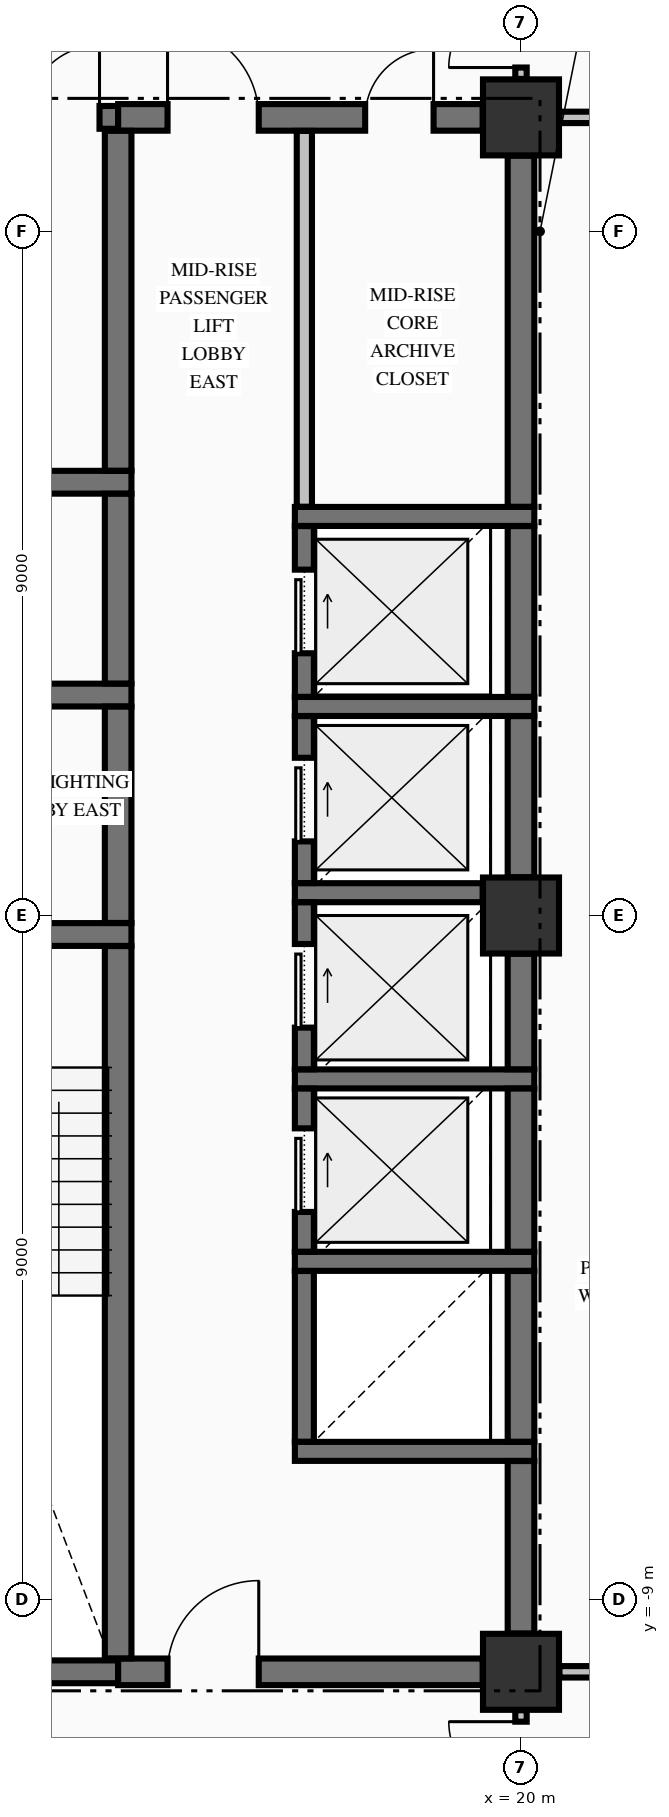
"""IFC4 building model, lengths in metres.
Left out: names, types, materials, properties, quantities, classifications, styles, units other than length and angle.
Written with IfcOpenShell. Run it as: python <this file> out.ifc"""

import sys

from ifc_helpers import new_model, si_unit, direction, frame, frame_2d, origin, origin_2d, place, context, subcontext, project, spatial, rectangle, extrude, element, fill, save


model = new_model("IFC4")
c1 = context("Model", 3, precision=1e-05, world=origin(), true_north=direction((0.0, 1.0)))
c2 = subcontext(c1, "Body", "Model", "MODEL_VIEW")
j1 = project(units=[si_unit("LENGTHUNIT", "METRE"), si_unit("PLANEANGLEUNIT", "RADIAN")], contexts=[c1])
p1 = place(None, origin())
s1 = spatial("IfcSite", under=j1, at=p1, CompositionType="ELEMENT")
p2 = place(p1, origin())
s2 = spatial("IfcBuilding", under=s1, at=p2, CompositionType="ELEMENT")
p3 = place(p2, frame((0.0, 0.0, 142.77)))
s3 = spatial("IfcBuildingStorey", under=s2, at=p3, CompositionType="ELEMENT", Elevation=142.77)
for number, where, z_axis, x_axis in (
    (1, (20.0, -9.95, -0.325), (0.0, 0.0, 1.0), (1.0, 0.0, 0.0)),
    (2, (20.0, 10.5, -0.325), (0.0, 0.0, 1.0), (1.0, 0.0, 0.0)),
    (3, (20.0, 0.0, -0.325), (0.0, 0.0, 1.0), (1.0, 0.0, 0.0)),
):
    element("IfcColumn", number, at=place(p3, frame(where, z_axis=z_axis, x_axis=x_axis)), inside=s3, PredefinedType="COLUMN", context=c2, shape_type="SweptSolid", body=[
        extrude(rectangle(XDim=1.0, YDim=1.0, at=origin_2d()), origin(), (0.0, 0.0, 1.0), 3.645),
    ])
p4 = place(p3, frame((11.504, -9.95, 0.0), z_axis=(0.0, 0.0, 1.0), x_axis=(1.0, 0.0, 0.0)))
e4 = element("IfcWall", 4, at=p4, inside=s3, PredefinedType="SHEAR", context=c2, shape_type="SweptSolid", body=[
    extrude(rectangle(XDim=3.196, YDim=0.3, at=frame_2d((1.598, 0.0))), origin(), (0.0, 0.0, 1.0), 3.32),
])
p5 = place(p3, frame((14.7, -9.95, 0.0), z_axis=(0.0, 0.0, 1.0), x_axis=(1.0, 0.0, 0.0)))
e5 = element("IfcWall", 5, at=p5, inside=s3, PredefinedType="SHEAR", context=c2, shape_type="SweptSolid", body=[
    extrude(rectangle(XDim=4.796, YDim=0.35, at=frame_2d((2.398, 0.0))), origin(), (0.0, 0.0, 1.0), 3.32),
])
p6 = place(p5, frame((0.65, 0.0, 0.0)))
e6 = element("IfcOpeningElement", 6, at=p6, cuts=e5, PredefinedType="OPENING", context=c2, shape_type="SweptSolid", body=[
    extrude(rectangle(XDim=1.2, YDim=2.15, at=frame_2d((0.6, 1.075))), frame((0.0, 0.185, 0.0), z_axis=(0.0, -1.0, 0.0), x_axis=(1.0, 0.0, 0.0)), (0.0, 0.0, 1.0), 0.37),
])
for number, where, z_axis, x_axis in (
    (7, (17.025, -7.05, 0.0), (0.0, 0.0, 1.0), (1.0, 0.0, 0.0)),
    (8, (17.025, -4.55, 0.0), (0.0, 0.0, 1.0), (1.0, 0.0, 0.0)),
    (9, (17.025, -2.15, 0.0), (0.0, 0.0, 1.0), (1.0, 0.0, 0.0)),
):
    element("IfcWall", number, at=place(p3, frame(where, z_axis=z_axis, x_axis=x_axis)), inside=s3, PredefinedType="SOLIDWALL", context=c2, shape_type="SweptSolid", body=[
        extrude(rectangle(XDim=3.15, YDim=0.25, at=frame_2d((1.575, 0.0))), origin(), (0.0, 0.0, 1.0), 3.32),
    ])
p7 = place(p3, frame((11.504, -0.25, 0.0), z_axis=(0.0, 0.0, 1.0), x_axis=(1.0, 0.0, 0.0)))
e10 = element("IfcWall", 10, at=p7, inside=s3, PredefinedType="SHEAR", context=c2, shape_type="SweptSolid", body=[
    extrude(rectangle(XDim=3.371, YDim=0.3, at=frame_2d((1.686, 0.0))), origin(), (0.0, 0.0, 1.0), 3.32),
])
p8 = place(p7, frame((1.096, 0.0, 0.0)))
e11 = element("IfcOpeningElement", 11, at=p8, cuts=e10, PredefinedType="OPENING", context=c2, shape_type="SweptSolid", body=[
    extrude(rectangle(XDim=1.1, YDim=2.15, at=frame_2d((0.55, 1.075))), frame((0.0, 0.16, 0.0), z_axis=(0.0, -1.0, 0.0), x_axis=(1.0, 0.0, 0.0)), (0.0, 0.0, 1.0), 0.32),
])
p9 = place(p3, frame((17.025, 0.3, 0.0), z_axis=(0.0, 0.0, 1.0), x_axis=(1.0, 0.0, 0.0)))
e12 = element("IfcWall", 12, at=p9, inside=s3, PredefinedType="SOLIDWALL", context=c2, shape_type="SweptSolid", body=[
    extrude(rectangle(XDim=2.471, YDim=0.25, at=frame_2d((1.236, 0.0))), origin(), (0.0, 0.0, 1.0), 3.32),
])
p10 = place(p3, frame((17.025, 2.75, 0.0), z_axis=(0.0, 0.0, 1.0), x_axis=(1.0, 0.0, 0.0)))
e13 = element("IfcWall", 13, at=p10, inside=s3, PredefinedType="SOLIDWALL", context=c2, shape_type="SweptSolid", body=[
    extrude(rectangle(XDim=3.15, YDim=0.25, at=frame_2d((1.575, 0.0))), origin(), (0.0, 0.0, 1.0), 3.32),
])
p11 = place(p3, frame((10.85, 2.9, 0.0), z_axis=(0.0, 0.0, 1.0), x_axis=(1.0, 0.0, 0.0)))
e14 = element("IfcWall", 14, at=p11, inside=s3, PredefinedType="SHEAR", context=c2, shape_type="SweptSolid", body=[
    extrude(rectangle(XDim=4.025, YDim=0.3, at=frame_2d((2.012, 0.0))), origin(), (0.0, 0.0, 1.0), 3.32),
])
p12 = place(p11, frame((0.85, 0.0, 0.0)))
e15 = element("IfcOpeningElement", 15, at=p12, cuts=e14, PredefinedType="OPENING", context=c2, shape_type="SweptSolid", body=[
    extrude(rectangle(XDim=1.1, YDim=2.2, at=frame_2d((0.55, 1.1))), frame((0.0, 0.16, 0.0), z_axis=(0.0, -1.0, 0.0), x_axis=(1.0, 0.0, 0.0)), (0.0, 0.0, 1.0), 0.32),
])
p13 = place(p3, frame((17.025, 5.25, 0.0), z_axis=(0.0, 0.0, 1.0), x_axis=(1.0, 0.0, 0.0)))
e16 = element("IfcWall", 16, at=p13, inside=s3, PredefinedType="SOLIDWALL", context=c2, shape_type="SweptSolid", body=[
    extrude(rectangle(XDim=3.15, YDim=0.25, at=frame_2d((1.575, 0.0))), origin(), (0.0, 0.0, 1.0), 3.32),
])
p14 = place(p3, frame((10.85, 5.7, 0.0), z_axis=(0.0, 0.0, 1.0), x_axis=(1.0, 0.0, 0.0)))
e17 = element("IfcWall", 17, at=p14, inside=s3, PredefinedType="SHEAR", context=c2, shape_type="SweptSolid", body=[
    extrude(rectangle(XDim=4.025, YDim=0.3, at=frame_2d((2.012, 0.0))), origin(), (0.0, 0.0, 1.0), 3.32),
])
p15 = place(p3, frame((11.504, 10.5, 0.0), z_axis=(0.0, 0.0, 1.0), x_axis=(1.0, 0.0, 0.0)))
e18 = element("IfcWall", 18, at=p15, inside=s3, PredefinedType="SHEAR", context=c2, shape_type="SweptSolid", body=[
    extrude(rectangle(XDim=3.196, YDim=0.3, at=frame_2d((1.598, 0.0))), origin(), (0.0, 0.0, 1.0), 3.32),
])
p16 = place(p15, frame((2.001, 0.0, 0.0)))
e19 = element("IfcOpeningElement", 19, at=p16, cuts=e18, PredefinedType="OPENING", context=c2, shape_type="SweptSolid", body=[
    extrude(rectangle(XDim=0.95, YDim=2.15, at=frame_2d((0.475, 1.075))), frame((0.0, 0.16, 0.0), z_axis=(0.0, -1.0, 0.0), x_axis=(1.0, 0.0, 0.0)), (0.0, 0.0, 1.0), 0.32),
])
p17 = place(p3, frame((14.7, 10.5, 0.0), z_axis=(0.0, 0.0, 1.0), x_axis=(1.0, 0.0, 0.0)))
e20 = element("IfcWall", 20, at=p17, inside=s3, PredefinedType="SHEAR", context=c2, shape_type="SweptSolid", body=[
    extrude(rectangle(XDim=4.796, YDim=0.35, at=frame_2d((2.398, 0.0))), origin(), (0.0, 0.0, 1.0), 3.32),
])
p18 = place(p17, frame((0.65, 0.0, 0.0)))
e21 = element("IfcOpeningElement", 21, at=p18, cuts=e20, PredefinedType="OPENING", context=c2, shape_type="SweptSolid", body=[
    extrude(rectangle(XDim=1.2, YDim=2.15, at=frame_2d((0.6, 1.075))), frame((0.0, 0.185, 0.0), z_axis=(0.0, -1.0, 0.0), x_axis=(1.0, 0.0, 0.0)), (0.0, 0.0, 1.0), 0.37),
])
p19 = place(p17, frame((3.25, 0.0, 0.0)))
e22 = element("IfcOpeningElement", 22, at=p19, cuts=e20, PredefinedType="OPENING", context=c2, shape_type="SweptSolid", body=[
    extrude(rectangle(XDim=0.9, YDim=2.15, at=frame_2d((0.45, 1.075))), frame((0.0, 0.185, 0.0), z_axis=(0.0, -1.0, 0.0), x_axis=(1.0, 0.0, 0.0)), (0.0, 0.0, 1.0), 0.37),
])
p20 = place(p3, frame((20.506, -9.95, 0.0), z_axis=(0.0, 0.0, 1.0), x_axis=(1.0, 0.0, 0.0)))
e23 = element("IfcWall", 23, at=p20, inside=s3, PredefinedType="PARTITIONING", context=c2, shape_type="SweptSolid", body=[
    extrude(rectangle(XDim=2.329, YDim=0.15, at=frame_2d((1.165, 0.0))), origin(), (0.0, 0.0, 1.0), 3.32),
])
p21 = place(p20, frame((0.494, 0.0, 0.0)))
e24 = element("IfcOpeningElement", 24, at=p21, cuts=e23, PredefinedType="OPENING", context=c2, shape_type="SweptSolid", body=[
    extrude(rectangle(XDim=1.0, YDim=2.15, at=frame_2d((0.5, 1.075))), frame((0.0, 0.085, 0.0), z_axis=(0.0, -1.0, 0.0), x_axis=(1.0, 0.0, 0.0)), (0.0, 0.0, 1.0), 0.17),
])
p22 = place(p3, frame((20.506, 10.5, 0.0), z_axis=(0.0, 0.0, 1.0), x_axis=(1.0, 0.0, 0.0)))
e25 = element("IfcWall", 25, at=p22, inside=s3, PredefinedType="PARTITIONING", context=c2, shape_type="SweptSolid", body=[
    extrude(rectangle(XDim=2.329, YDim=0.15, at=frame_2d((1.165, 0.0))), origin(), (0.0, 0.0, 1.0), 3.32),
])
p23 = place(p22, frame((0.494, 0.0, 0.0)))
e26 = element("IfcOpeningElement", 26, at=p23, cuts=e25, PredefinedType="OPENING", context=c2, shape_type="SweptSolid", body=[
    extrude(rectangle(XDim=1.0, YDim=2.15, at=frame_2d((0.5, 1.075))), frame((0.0, 0.085, 0.0), z_axis=(0.0, -1.0, 0.0), x_axis=(1.0, 0.0, 0.0)), (0.0, 0.0, 1.0), 0.17),
])
p24 = place(p3, frame((14.7, -9.773, 0.0), z_axis=(0.0, 0.0, 1.0), x_axis=(0.0, 1.0, 0.0)))
e27 = element("IfcWall", 27, at=p24, inside=s3, PredefinedType="SHEAR", context=c2, shape_type="SweptSolid", body=[
    extrude(rectangle(XDim=9.371, YDim=0.35, at=frame_2d((4.686, 0.0))), origin(), (0.0, 0.0, 1.0), 3.32),
])
p25 = place(p3, frame((14.7, -0.098, 0.0), z_axis=(0.0, 0.0, 1.0), x_axis=(0.0, 1.0, 0.0)))
e28 = element("IfcWall", 28, at=p25, inside=s3, PredefinedType="SHEAR", context=c2, shape_type="SweptSolid", body=[
    extrude(rectangle(XDim=2.846, YDim=0.35, at=frame_2d((1.423, 0.0))), origin(), (0.0, 0.0, 1.0), 3.32),
])
p26 = place(p3, frame((14.7, 3.052, 0.0), z_axis=(0.0, 0.0, 1.0), x_axis=(0.0, 1.0, 0.0)))
e29 = element("IfcWall", 29, at=p26, inside=s3, PredefinedType="SHEAR", context=c2, shape_type="SweptSolid", body=[
    extrude(rectangle(XDim=2.496, YDim=0.35, at=frame_2d((1.248, 0.0))), origin(), (0.0, 0.0, 1.0), 3.32),
])
p27 = place(p3, frame((14.7, 5.852, 0.0), z_axis=(0.0, 0.0, 1.0), x_axis=(0.0, 1.0, 0.0)))
e30 = element("IfcWall", 30, at=p27, inside=s3, PredefinedType="SHEAR", context=c2, shape_type="SweptSolid", body=[
    extrude(rectangle(XDim=4.471, YDim=0.35, at=frame_2d((2.235, 0.0))), origin(), (0.0, 0.0, 1.0), 3.32),
])
p28 = place(p3, frame((17.15, -6.923, 0.0), z_axis=(0.0, 0.0, 1.0), x_axis=(0.0, 1.0, 0.0)))
e31 = element("IfcWall", 31, at=p28, inside=s3, PredefinedType="SOLIDWALL", context=c2, shape_type="SweptSolid", body=[
    extrude(rectangle(XDim=2.246, YDim=0.25, at=frame_2d((1.123, 0.0))), origin(), (0.0, 0.0, 1.0), 3.32),
])
p29 = place(p3, frame((17.15, -4.423, 0.0), z_axis=(0.0, 0.0, 1.0), x_axis=(0.0, 1.0, 0.0)))
e32 = element("IfcWall", 32, at=p29, inside=s3, PredefinedType="SOLIDWALL", context=c2, shape_type="SweptSolid", body=[
    extrude(rectangle(XDim=2.146, YDim=0.25, at=frame_2d((1.073, 0.0))), origin(), (0.0, 0.0, 1.0), 3.32),
])
p30 = place(p29, frame((0.523, 0.0, 0.0)))
e33 = element("IfcOpeningElement", 33, at=p30, cuts=e32, PredefinedType="OPENING", context=c2, shape_type="SweptSolid", body=[
    extrude(rectangle(XDim=1.1, YDim=2.2, at=frame_2d((0.55, 1.1))), frame((0.0, 0.135, 0.0), z_axis=(0.0, -1.0, 0.0), x_axis=(1.0, 0.0, 0.0)), (0.0, 0.0, 1.0), 0.27),
])
p31 = place(p3, frame((17.15, -2.023, 0.0), z_axis=(0.0, 0.0, 1.0), x_axis=(0.0, 1.0, 0.0)))
e34 = element("IfcWall", 34, at=p31, inside=s3, PredefinedType="SOLIDWALL", context=c2, shape_type="SweptSolid", body=[
    extrude(rectangle(XDim=2.196, YDim=0.25, at=frame_2d((1.098, 0.0))), origin(), (0.0, 0.0, 1.0), 3.32),
])
p32 = place(p31, frame((0.548, 0.0, 0.0)))
e35 = element("IfcOpeningElement", 35, at=p32, cuts=e34, PredefinedType="OPENING", context=c2, shape_type="SweptSolid", body=[
    extrude(rectangle(XDim=1.1, YDim=2.2, at=frame_2d((0.55, 1.1))), frame((0.0, 0.135, 0.0), z_axis=(0.0, -1.0, 0.0), x_axis=(1.0, 0.0, 0.0)), (0.0, 0.0, 1.0), 0.27),
])
p33 = place(p3, frame((17.15, 0.427, 0.0), z_axis=(0.0, 0.0, 1.0), x_axis=(0.0, 1.0, 0.0)))
e36 = element("IfcWall", 36, at=p33, inside=s3, PredefinedType="SOLIDWALL", context=c2, shape_type="SweptSolid", body=[
    extrude(rectangle(XDim=2.196, YDim=0.25, at=frame_2d((1.098, 0.0))), origin(), (0.0, 0.0, 1.0), 3.32),
])
p34 = place(p33, frame((0.548, 0.0, 0.0)))
e37 = element("IfcOpeningElement", 37, at=p34, cuts=e36, PredefinedType="OPENING", context=c2, shape_type="SweptSolid", body=[
    extrude(rectangle(XDim=1.1, YDim=2.2, at=frame_2d((0.55, 1.1))), frame((0.0, 0.135, 0.0), z_axis=(0.0, -1.0, 0.0), x_axis=(1.0, 0.0, 0.0)), (0.0, 0.0, 1.0), 0.27),
])
p35 = place(p3, frame((17.15, 2.877, 0.0), z_axis=(0.0, 0.0, 1.0), x_axis=(0.0, 1.0, 0.0)))
e38 = element("IfcWall", 38, at=p35, inside=s3, PredefinedType="SOLIDWALL", context=c2, shape_type="SweptSolid", body=[
    extrude(rectangle(XDim=2.246, YDim=0.25, at=frame_2d((1.123, 0.0))), origin(), (0.0, 0.0, 1.0), 3.32),
])
p36 = place(p35, frame((0.573, 0.0, 0.0)))
e39 = element("IfcOpeningElement", 39, at=p36, cuts=e38, PredefinedType="OPENING", context=c2, shape_type="SweptSolid", body=[
    extrude(rectangle(XDim=1.1, YDim=2.2, at=frame_2d((0.55, 1.1))), frame((0.0, 0.135, 0.0), z_axis=(0.0, -1.0, 0.0), x_axis=(1.0, 0.0, 0.0)), (0.0, 0.0, 1.0), 0.27),
])
p37 = place(p3, frame((20.0, -9.446, 0.0), z_axis=(0.0, 0.0, 1.0), x_axis=(0.0, 1.0, 0.0)))
e40 = element("IfcWall", 40, at=p37, inside=s3, PredefinedType="SHEAR", context=c2, shape_type="SweptSolid", body=[
    extrude(rectangle(XDim=2.269, YDim=0.35, at=frame_2d((1.135, 0.0))), origin(), (0.0, 0.0, 1.0), 3.32),
])
p38 = place(p3, frame((20.0, -6.923, 0.0), z_axis=(0.0, 0.0, 1.0), x_axis=(0.0, 1.0, 0.0)))
e41 = element("IfcWall", 41, at=p38, inside=s3, PredefinedType="SHEAR", context=c2, shape_type="SweptSolid", body=[
    extrude(rectangle(XDim=2.246, YDim=0.35, at=frame_2d((1.123, 0.0))), origin(), (0.0, 0.0, 1.0), 3.32),
])
p39 = place(p3, frame((20.0, -4.423, 0.0), z_axis=(0.0, 0.0, 1.0), x_axis=(0.0, 1.0, 0.0)))
e42 = element("IfcWall", 42, at=p39, inside=s3, PredefinedType="SHEAR", context=c2, shape_type="SweptSolid", body=[
    extrude(rectangle(XDim=2.146, YDim=0.35, at=frame_2d((1.073, 0.0))), origin(), (0.0, 0.0, 1.0), 3.32),
])
p40 = place(p3, frame((20.0, -2.023, 0.0), z_axis=(0.0, 0.0, 1.0), x_axis=(0.0, 1.0, 0.0)))
e43 = element("IfcWall", 43, at=p40, inside=s3, PredefinedType="SHEAR", context=c2, shape_type="SweptSolid", body=[
    extrude(rectangle(XDim=1.519, YDim=0.35, at=frame_2d((0.76, 0.0))), origin(), (0.0, 0.0, 1.0), 3.32),
])
p41 = place(p3, frame((20.0, 0.504, 0.0), z_axis=(0.0, 0.0, 1.0), x_axis=(0.0, 1.0, 0.0)))
e44 = element("IfcWall", 44, at=p41, inside=s3, PredefinedType="SHEAR", context=c2, shape_type="SweptSolid", body=[
    extrude(rectangle(XDim=2.119, YDim=0.35, at=frame_2d((1.06, 0.0))), origin(), (0.0, 0.0, 1.0), 3.32),
])
p42 = place(p3, frame((20.0, 2.877, 0.0), z_axis=(0.0, 0.0, 1.0), x_axis=(0.0, 1.0, 0.0)))
e45 = element("IfcWall", 45, at=p42, inside=s3, PredefinedType="SHEAR", context=c2, shape_type="SweptSolid", body=[
    extrude(rectangle(XDim=2.246, YDim=0.35, at=frame_2d((1.123, 0.0))), origin(), (0.0, 0.0, 1.0), 3.32),
])
p43 = place(p3, frame((20.0, 5.377, 0.0), z_axis=(0.0, 0.0, 1.0), x_axis=(0.0, 1.0, 0.0)))
e46 = element("IfcWall", 46, at=p43, inside=s3, PredefinedType="SHEAR", context=c2, shape_type="SweptSolid", body=[
    extrude(rectangle(XDim=4.619, YDim=0.35, at=frame_2d((2.31, 0.0))), origin(), (0.0, 0.0, 1.0), 3.32),
])
p44 = place(p3, frame((17.15, 5.378, 0.0), z_axis=(0.0, 0.0, 1.0), x_axis=(0.0, 1.0, 0.0)))
e47 = element("IfcWall", 47, at=p44, inside=s3, PredefinedType="PARTITIONING", context=c2, shape_type="SweptSolid", body=[
    extrude(rectangle(XDim=4.944, YDim=0.2, at=frame_2d((2.472, 0.0))), origin(), (0.0, 0.0, 1.0), 3.32),
])
p45 = place(p3, frame((20.0, -12.122, 0.0), z_axis=(0.0, 0.0, 1.0), x_axis=(0.0, 1.0, 0.0)))
e48 = element("IfcWall", 48, at=p45, inside=s3, PredefinedType="PARTITIONING", context=c2, shape_type="SweptSolid", body=[
    extrude(rectangle(XDim=1.666, YDim=0.15, at=frame_2d((0.833, 0.0))), origin(), (0.0, 0.0, 1.0), 2.81),
])
p46 = place(p45, frame((0.566, 0.0, 0.0)))
e49 = element("IfcOpeningElement", 49, at=p46, cuts=e48, PredefinedType="OPENING", context=c2, shape_type="SweptSolid", body=[
    extrude(rectangle(XDim=0.95, YDim=2.15, at=frame_2d((0.475, 1.075))), frame((0.0, 0.085, 0.0), z_axis=(0.0, -1.0, 0.0), x_axis=(1.0, 0.0, 0.0)), (0.0, 0.0, 1.0), 0.17),
])
p47 = place(p3, frame((20.0, 11.006, 0.0), z_axis=(0.0, 0.0, 1.0), x_axis=(0.0, 1.0, 0.0)))
e50 = element("IfcWall", 50, at=p47, inside=s3, PredefinedType="PARTITIONING", context=c2, shape_type="SweptSolid", body=[
    extrude(rectangle(XDim=1.466, YDim=0.15, at=frame_2d((0.733, 0.0))), origin(), (0.0, 0.0, 1.0), 2.81),
])
p48 = place(p47, frame((0.15, 0.0, 0.0)))
e51 = element("IfcOpeningElement", 51, at=p48, cuts=e50, PredefinedType="OPENING", context=c2, shape_type="SweptSolid", body=[
    extrude(rectangle(XDim=0.95, YDim=2.15, at=frame_2d((0.475, 1.075))), frame((0.0, 0.085, 0.0), z_axis=(0.0, -1.0, 0.0), x_axis=(1.0, 0.0, 0.0)), (0.0, 0.0, 1.0), 0.17),
])
p49 = place(p16, origin())
e52 = element("IfcDoor", 52, at=p49, inside=s3, OperationType="SINGLE_SWING_RIGHT", PredefinedType="DOOR", context=c2, shape_type="SweptSolid", body=[
    extrude(rectangle(XDim=0.95, YDim=2.15, at=frame_2d((0.475, 1.075))), frame((0.0, 0.025, 0.0), z_axis=(0.0, -1.0, 0.0), x_axis=(1.0, 0.0, 0.0)), (0.0, 0.0, 1.0), 0.05),
])
fill(e19, e52)
p50 = place(p30, origin())
e53 = element("IfcDoor", 53, at=p50, inside=s3, OperationType="SLIDING_TO_RIGHT", PredefinedType="DOOR", context=c2, shape_type="SweptSolid", body=[
    extrude(rectangle(XDim=1.1, YDim=2.2, at=frame_2d((0.55, 1.1))), frame((0.0, 0.025, 0.0), z_axis=(0.0, -1.0, 0.0), x_axis=(1.0, 0.0, 0.0)), (0.0, 0.0, 1.0), 0.05),
])
fill(e33, e53)
p51 = place(p32, origin())
e54 = element("IfcDoor", 54, at=p51, inside=s3, OperationType="SLIDING_TO_RIGHT", PredefinedType="DOOR", context=c2, shape_type="SweptSolid", body=[
    extrude(rectangle(XDim=1.1, YDim=2.2, at=frame_2d((0.55, 1.1))), frame((0.0, 0.025, 0.0), z_axis=(0.0, -1.0, 0.0), x_axis=(1.0, 0.0, 0.0)), (0.0, 0.0, 1.0), 0.05),
])
fill(e35, e54)
p52 = place(p34, origin())
e55 = element("IfcDoor", 55, at=p52, inside=s3, OperationType="SLIDING_TO_RIGHT", PredefinedType="DOOR", context=c2, shape_type="SweptSolid", body=[
    extrude(rectangle(XDim=1.1, YDim=2.2, at=frame_2d((0.55, 1.1))), frame((0.0, 0.025, 0.0), z_axis=(0.0, -1.0, 0.0), x_axis=(1.0, 0.0, 0.0)), (0.0, 0.0, 1.0), 0.05),
])
fill(e37, e55)
p53 = place(p36, origin())
e56 = element("IfcDoor", 56, at=p53, inside=s3, OperationType="SLIDING_TO_RIGHT", PredefinedType="DOOR", context=c2, shape_type="SweptSolid", body=[
    extrude(rectangle(XDim=1.1, YDim=2.2, at=frame_2d((0.55, 1.1))), frame((0.0, 0.025, 0.0), z_axis=(0.0, -1.0, 0.0), x_axis=(1.0, 0.0, 0.0)), (0.0, 0.0, 1.0), 0.05),
])
fill(e39, e56)
p54 = place(p6, origin())
e57 = element("IfcDoor", 57, at=p54, inside=s3, OperationType="SINGLE_SWING_RIGHT", PredefinedType="DOOR", context=c2, shape_type="SweptSolid", body=[
    extrude(rectangle(XDim=1.2, YDim=2.15, at=frame_2d((0.6, 1.075))), frame((0.0, 0.025, 0.0), z_axis=(0.0, -1.0, 0.0), x_axis=(1.0, 0.0, 0.0)), (0.0, 0.0, 1.0), 0.05),
])
fill(e6, e57)
p55 = place(p18, origin())
e58 = element("IfcDoor", 58, at=p55, inside=s3, OperationType="SINGLE_SWING_LEFT", PredefinedType="DOOR", context=c2, shape_type="SweptSolid", body=[
    extrude(rectangle(XDim=1.2, YDim=2.15, at=frame_2d((0.6, 1.075))), frame((0.0, 0.025, 0.0), z_axis=(0.0, -1.0, 0.0), x_axis=(1.0, 0.0, 0.0)), (0.0, 0.0, 1.0), 0.05),
])
fill(e21, e58)
p56 = place(p19, origin())
e59 = element("IfcDoor", 59, at=p56, inside=s3, OperationType="SINGLE_SWING_RIGHT", PredefinedType="DOOR", context=c2, shape_type="SweptSolid", body=[
    extrude(rectangle(XDim=0.9, YDim=2.15, at=frame_2d((0.45, 1.075))), frame((0.0, 0.025, 0.0), z_axis=(0.0, -1.0, 0.0), x_axis=(1.0, 0.0, 0.0)), (0.0, 0.0, 1.0), 0.05),
])
fill(e22, e59)
p57 = place(p48, origin())
e60 = element("IfcDoor", 60, at=p57, inside=s3, OperationType="SINGLE_SWING_LEFT", PredefinedType="DOOR", context=c2, shape_type="SweptSolid", body=[
    extrude(rectangle(XDim=0.95, YDim=2.15, at=frame_2d((0.475, 1.075))), frame((0.0, 0.025, 0.0), z_axis=(0.0, -1.0, 0.0), x_axis=(1.0, 0.0, 0.0)), (0.0, 0.0, 1.0), 0.05),
])
fill(e51, e60)
p58 = place(p46, origin())
e61 = element("IfcDoor", 61, at=p58, inside=s3, OperationType="SINGLE_SWING_RIGHT", PredefinedType="DOOR", context=c2, shape_type="SweptSolid", body=[
    extrude(rectangle(XDim=0.95, YDim=2.15, at=frame_2d((0.475, 1.075))), frame((0.0, 0.025, 0.0), z_axis=(0.0, -1.0, 0.0), x_axis=(1.0, 0.0, 0.0)), (0.0, 0.0, 1.0), 0.05),
])
fill(e49, e61)
save(model, sys.argv[1])
